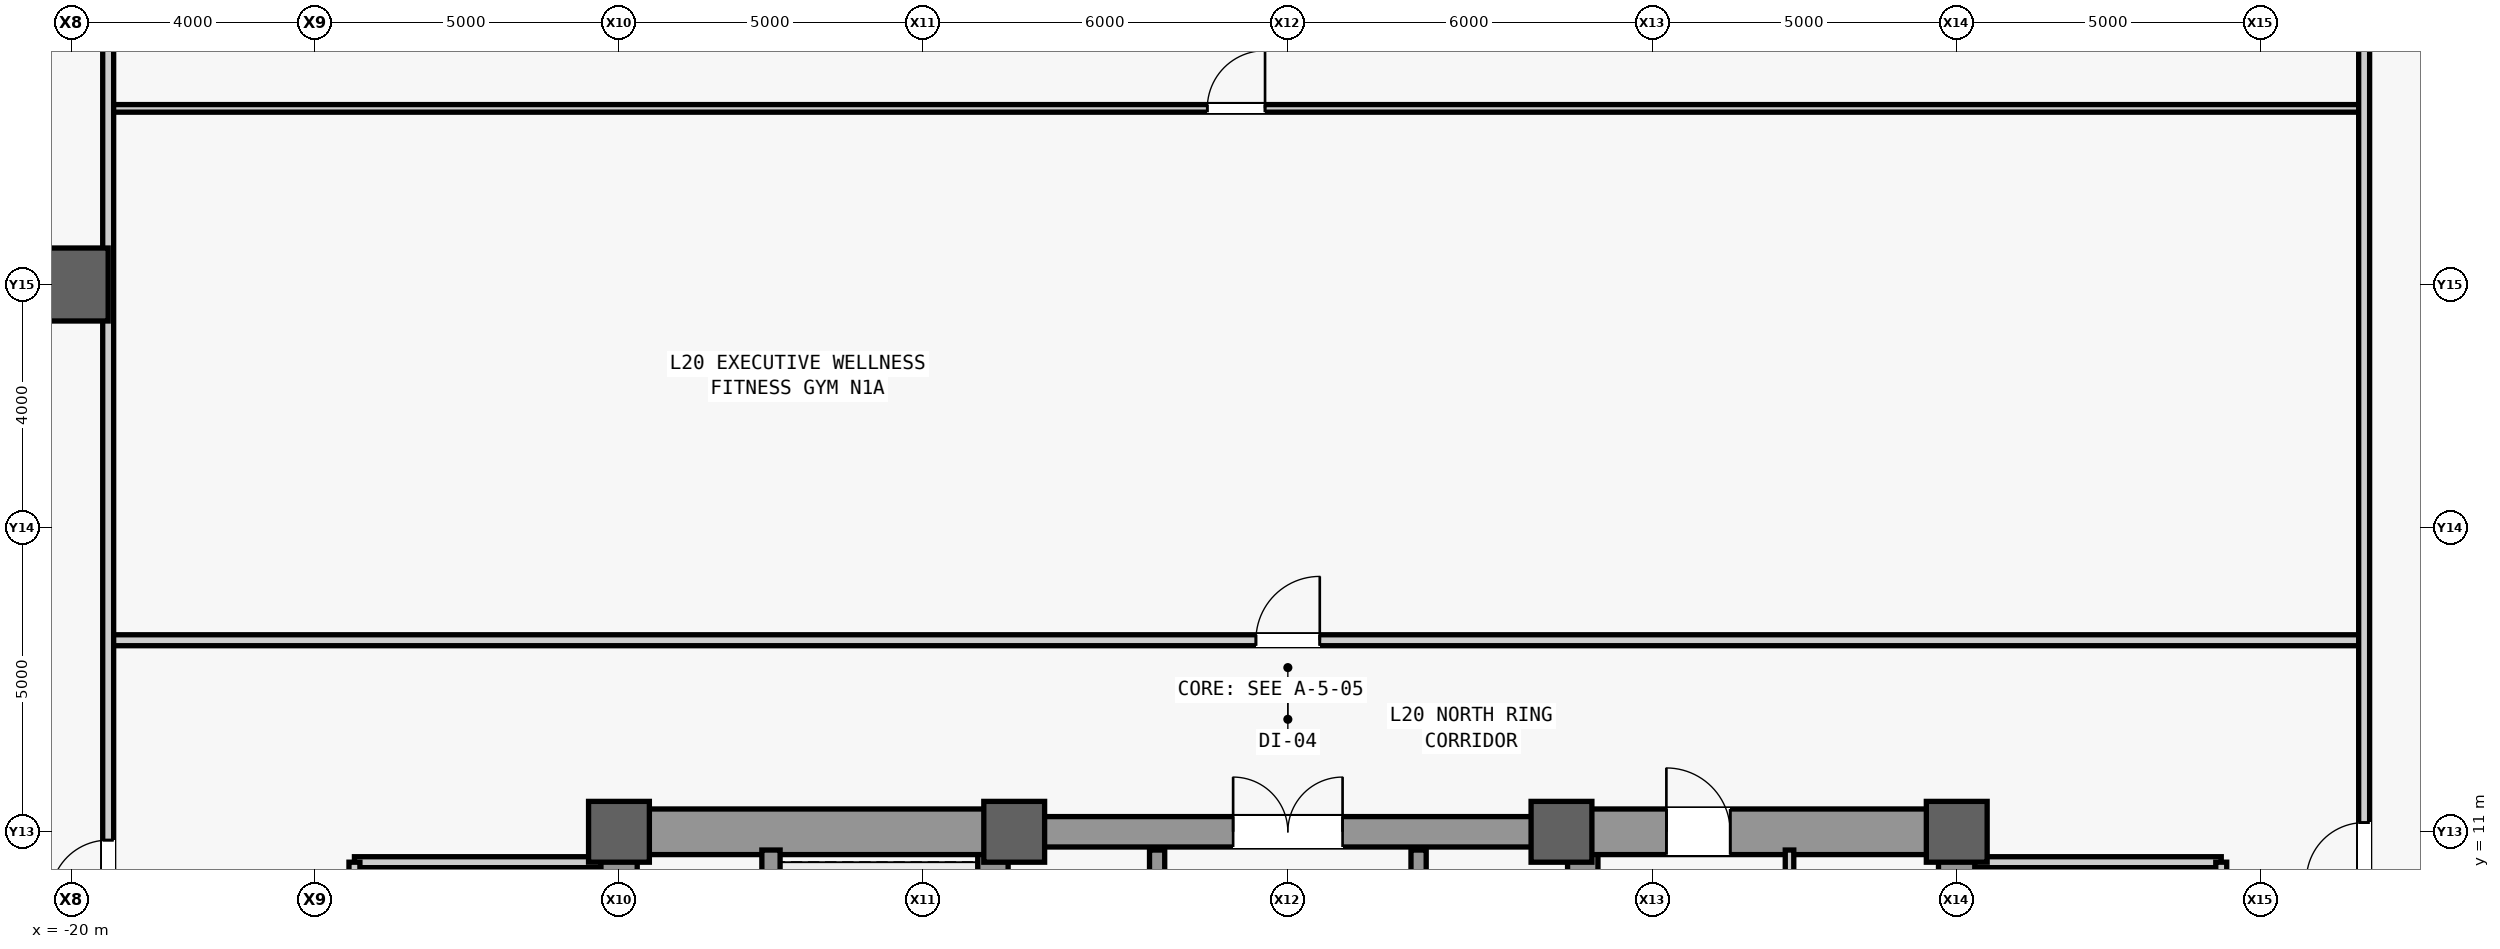
"""IFC4 building model, lengths in metres.
Left out: names, types, materials, properties, quantities, classifications, styles, units other than length and angle.
Written with IfcOpenShell. Run it as: python <this file> out.ifc"""

import sys

from ifc_helpers import new_model, si_unit, direction, frame, frame_2d, origin, origin_2d, place, context, subcontext, project, spatial, rectangle, hollow_rectangle, extrude, source, transform, mapped, element, fill, save


model = new_model("IFC4")
c1 = context("Model", 3, precision=1e-05, world=origin(), true_north=direction((0.0, 1.0)))
c2 = subcontext(c1, "Body", "Model", "MODEL_VIEW")
j1 = project(units=[si_unit("LENGTHUNIT", "METRE"), si_unit("PLANEANGLEUNIT", "RADIAN")], contexts=[c1])
p1 = place(None, origin())
s1 = spatial("IfcSite", under=j1, at=p1, CompositionType="ELEMENT")
p2 = place(p1, origin())
s2 = spatial("IfcBuilding", under=s1, at=p2, CompositionType="ELEMENT")
p3 = place(p2, frame((0.0, 0.0, 91.4)))
s3 = spatial("IfcBuildingStorey", under=s2, at=p3, CompositionType="ELEMENT", Elevation=91.4)
m1 = source(origin(), c2, "Body", "SweptSolid", [
    extrude(rectangle(XDim=22.0, YDim=0.6, at=frame_2d((11.0, 0.0))), origin(), (0.0, 0.0, 1.0), 3.84),
])
p4 = place(p3, frame((-11.0, -11.0, 0.0), z_axis=(0.0, 0.0, 1.0), x_axis=(0.0, 1.0, 0.0)))
e1 = element("IfcWall", 1, at=p4, inside=s3, PredefinedType="SHEAR", context=c2, shape_type="MappedRepresentation", body=[
    mapped(m1, transform((0.0, 0.0, 0.0), scale=1.0)),
])
m2 = source(origin(), c2, "Body", "SweptSolid", [
    extrude(rectangle(XDim=1.1, YDim=2.2, at=frame_2d((0.55, 1.1))), frame((0.0, 0.31, 0.0), z_axis=(0.0, -1.0, 0.0), x_axis=(1.0, 0.0, 0.0)), (0.0, 0.0, 1.0), 0.62),
])
p5 = place(p4, frame((0.8, 0.0, 0.0)))
e2 = element("IfcOpeningElement", 2, at=p5, cuts=e1, PredefinedType="OPENING", context=c2, shape_type="MappedRepresentation", body=[
    mapped(m2, transform((0.0, 0.0, 0.0), scale=1.0)),
])
p6 = place(p4, frame((12.5, 0.0, 0.0)))
e3 = element("IfcOpeningElement", 3, at=p6, cuts=e1, PredefinedType="OPENING", context=c2, shape_type="MappedRepresentation", body=[
    mapped(m2, transform((0.0, 0.0, 0.0), scale=1.0)),
])
m3 = source(origin(), c2, "Body", "SweptSolid", [
    extrude(rectangle(XDim=0.9, YDim=2.15, at=frame_2d((0.45, 1.075))), frame((0.0, 0.31, 0.0), z_axis=(0.0, -1.0, 0.0), x_axis=(1.0, 0.0, 0.0)), (0.0, 0.0, 1.0), 0.62),
])
p7 = place(p4, frame((6.2, 0.0, 0.0)))
e4 = element("IfcOpeningElement", 4, at=p7, cuts=e1, PredefinedType="OPENING", context=c2, shape_type="MappedRepresentation", body=[
    mapped(m3, transform((0.0, 0.0, 0.0), scale=1.0)),
])
p8 = place(p4, frame((8.05, 0.0, 0.0)))
e5 = element("IfcOpeningElement", 5, at=p8, cuts=e1, PredefinedType="OPENING", context=c2, shape_type="MappedRepresentation", body=[
    mapped(m3, transform((0.0, 0.0, 0.0), scale=1.0)),
])
m4 = source(origin(), c2, "Body", "SweptSolid", [
    extrude(rectangle(XDim=1.3, YDim=2.3, at=frame_2d((0.65, 1.15))), frame((0.0, 0.31, 0.0), z_axis=(0.0, -1.0, 0.0), x_axis=(1.0, 0.0, 0.0)), (0.0, 0.0, 1.0), 0.62),
])
p9 = place(p4, frame((2.7, 0.0, 0.0)))
e6 = element("IfcOpeningElement", 6, at=p9, cuts=e1, PredefinedType="OPENING", context=c2, shape_type="MappedRepresentation", body=[
    mapped(m4, transform((0.0, 0.0, 0.0), scale=1.0)),
])
p10 = place(p3, frame((11.0, -11.0, 0.0), z_axis=(0.0, 0.0, 1.0), x_axis=(0.0, 1.0, 0.0)))
e7 = element("IfcWall", 7, at=p10, inside=s3, PredefinedType="SHEAR", context=c2, shape_type="MappedRepresentation", body=[
    mapped(m1, transform((0.0, 0.0, 0.0), scale=1.0)),
])
p11 = place(p10, frame((0.8, 0.0, 0.0)))
e8 = element("IfcOpeningElement", 8, at=p11, cuts=e7, PredefinedType="OPENING", context=c2, shape_type="MappedRepresentation", body=[
    mapped(m2, transform((0.0, 0.0, 0.0), scale=1.0)),
])
p12 = place(p10, frame((6.85, 0.0, 0.0)))
e9 = element("IfcOpeningElement", 9, at=p12, cuts=e7, PredefinedType="OPENING", context=c2, shape_type="MappedRepresentation", body=[
    mapped(m3, transform((0.0, 0.0, 0.0), scale=1.0)),
])
p13 = place(p10, frame((2.7, 0.0, 0.0)))
e10 = element("IfcOpeningElement", 10, at=p13, cuts=e7, PredefinedType="OPENING", context=c2, shape_type="MappedRepresentation", body=[
    mapped(m4, transform((0.0, 0.0, 0.0), scale=1.0)),
])
p14 = place(p10, frame((13.35, 0.0, 0.0)))
e11 = element("IfcOpeningElement", 11, at=p14, cuts=e7, PredefinedType="OPENING", context=c2, shape_type="MappedRepresentation", body=[
    mapped(m4, transform((0.0, 0.0, 0.0), scale=1.0)),
])
m5 = source(origin(), c2, "Body", "SweptSolid", [
    extrude(rectangle(XDim=21.4, YDim=0.5, at=frame_2d((10.7, 0.0))), origin(), (0.0, 0.0, 1.0), 3.84),
])
for number, where, z_axis, x_axis in (
    (12, (-4.85, -10.7, 0.0), (0.0, 0.0, 1.0), (0.0, 1.0, 0.0)),
    (13, (4.85, -10.7, 0.0), (0.0, 0.0, 1.0), (0.0, 1.0, 0.0)),
):
    element("IfcWall", number, at=place(p3, frame(where, z_axis=z_axis, x_axis=x_axis)), inside=s3, PredefinedType="SHEAR", context=c2, shape_type="MappedRepresentation", body=[
        mapped(m5, transform((0.0, 0.0, 0.0), scale=1.0)),
    ])
m6 = source(origin(), c2, "Body", "SweptSolid", [
    extrude(rectangle(XDim=5.85, YDim=0.75, at=frame_2d((2.925, 0.0))), origin(), (0.0, 0.0, 1.0), 3.84),
])
p15 = place(p3, frame((-10.7, 11.0, 0.0), z_axis=(0.0, 0.0, 1.0), x_axis=(1.0, 0.0, 0.0)))
e14 = element("IfcWall", 14, at=p15, inside=s3, PredefinedType="SHEAR", context=c2, shape_type="MappedRepresentation", body=[
    mapped(m6, transform((0.0, 0.0, 0.0), scale=1.0)),
])
p16 = place(p3, frame((4.85, 11.0, 0.0), z_axis=(0.0, 0.0, 1.0), x_axis=(1.0, 0.0, 0.0)))
e15 = element("IfcWall", 15, at=p16, inside=s3, PredefinedType="SHEAR", context=c2, shape_type="MappedRepresentation", body=[
    mapped(m6, transform((0.0, 0.0, 0.0), scale=1.0)),
])
m7 = source(origin(), c2, "Body", "SweptSolid", [
    extrude(rectangle(XDim=1.05, YDim=2.2, at=frame_2d((0.525, 1.1))), frame((0.0, 0.385, 0.0), z_axis=(0.0, -1.0, 0.0), x_axis=(1.0, 0.0, 0.0)), (0.0, 0.0, 1.0), 0.77),
])
p17 = place(p16, frame((1.375, 0.0, 0.0)))
e16 = element("IfcOpeningElement", 16, at=p17, cuts=e15, PredefinedType="OPENING", context=c2, shape_type="MappedRepresentation", body=[
    mapped(m7, transform((0.0, 0.0, 0.0), scale=1.0)),
])
m8 = source(origin(), c2, "Body", "SweptSolid", [
    extrude(rectangle(XDim=9.2, YDim=0.5, at=frame_2d((4.6, 0.0))), origin(), (0.0, 0.0, 1.0), 3.84),
])
p18 = place(p3, frame((-4.6, 11.0, 0.0), z_axis=(0.0, 0.0, 1.0), x_axis=(1.0, 0.0, 0.0)))
e17 = element("IfcWall", 17, at=p18, inside=s3, PredefinedType="SHEAR", context=c2, shape_type="MappedRepresentation", body=[
    mapped(m8, transform((0.0, 0.0, 0.0), scale=1.0)),
])
m9 = source(origin(), c2, "Body", "SweptSolid", [
    extrude(rectangle(XDim=1.8, YDim=2.25, at=frame_2d((0.9, 1.125))), frame((0.0, 0.26, 0.0), z_axis=(0.0, -1.0, 0.0), x_axis=(1.0, 0.0, 0.0)), (0.0, 0.0, 1.0), 0.52),
])
p19 = place(p18, frame((3.7, 0.0, 0.0)))
e18 = element("IfcOpeningElement", 18, at=p19, cuts=e17, PredefinedType="OPENING", context=c2, shape_type="MappedRepresentation", body=[
    mapped(m9, transform((0.0, 0.0, 0.0), scale=1.0)),
])
m10 = source(origin(), c2, "Body", "SweptSolid", [
    extrude(hollow_rectangle(XDim=1.2, YDim=1.2, WallThickness=0.07, at=origin_2d()), origin(), (0.0, 0.0, 1.0), 4.1),
])
p20 = place(p3, frame((-20.0, 20.0, 0.0), z_axis=(0.0, 0.0, 1.0), x_axis=(1.0, 0.0, 0.0)))
e19 = element("IfcColumn", 19, at=p20, inside=s3, PredefinedType="COLUMN", context=c2, shape_type="MappedRepresentation", body=[
    mapped(m10, transform((0.0, 0.0, 0.0), scale=1.0)),
])
m11 = source(origin(), c2, "Body", "SweptSolid", [
    extrude(rectangle(XDim=1.0, YDim=1.0, at=origin_2d()), origin(), (0.0, 0.0, 1.0), 4.1),
])
for number, where, z_axis, x_axis in (
    (20, (-11.0, 11.0, 0.0), (0.0, 0.0, 1.0), (1.0, 0.0, 0.0)),
    (21, (-4.5, 11.0, 0.0), (0.0, 0.0, 1.0), (1.0, 0.0, 0.0)),
    (22, (4.5, 11.0, 0.0), (0.0, 0.0, 1.0), (1.0, 0.0, 0.0)),
    (23, (11.0, 11.0, 0.0), (0.0, 0.0, 1.0), (1.0, 0.0, 0.0)),
):
    element("IfcColumn", number, at=place(p3, frame(where, z_axis=z_axis, x_axis=x_axis)), inside=s3, PredefinedType="COLUMN", context=c2, shape_type="MappedRepresentation", body=[
        mapped(m11, transform((0.0, 0.0, 0.0), scale=1.0)),
    ])
m12 = source(origin(), c2, "Body", "SweptSolid", [
    extrude(rectangle(XDim=7.75, YDim=0.3, at=frame_2d((3.875, 0.0))), origin(), (0.0, 0.0, 1.0), 3.84),
])
p21 = place(p3, frame((-8.5, 2.95, 0.0), z_axis=(0.0, 0.0, 1.0), x_axis=(0.0, 1.0, 0.0)))
e24 = element("IfcWall", 24, at=p21, inside=s3, PredefinedType="SHEAR", context=c2, shape_type="MappedRepresentation", body=[
    mapped(m12, transform((0.0, 0.0, 0.0), scale=1.0)),
])
m13 = source(origin(), c2, "Body", "SweptSolid", [
    extrude(rectangle(XDim=9.4, YDim=0.14, at=frame_2d((4.7, 0.0))), origin(), (0.0, 0.0, 1.0), 3.84),
])
p22 = place(p3, frame((8.25, 1.3, 0.0), z_axis=(0.0, 0.0, 1.0), x_axis=(0.0, 1.0, 0.0)))
e25 = element("IfcWall", 25, at=p22, inside=s3, PredefinedType="PARTITIONING", context=c2, shape_type="MappedRepresentation", body=[
    mapped(m13, transform((0.0, 0.0, 0.0), scale=1.0)),
])
m14 = source(origin(), c2, "Body", "SweptSolid", [
    extrude(rectangle(XDim=4.05, YDim=0.18, at=frame_2d((2.025, 0.0))), origin(), (0.0, 0.0, 1.0), 3.84),
])
p23 = place(p3, frame((-15.35, 10.5, 0.0), z_axis=(0.0, 0.0, 1.0), x_axis=(1.0, 0.0, 0.0)))
e26 = element("IfcWall", 26, at=p23, inside=s3, PredefinedType="PARTITIONING", context=c2, shape_type="MappedRepresentation", body=[
    mapped(m14, transform((0.0, 0.0, 0.0), scale=1.0)),
])
m15 = source(origin(), c2, "Body", "SweptSolid", [
    extrude(rectangle(XDim=16.6, YDim=0.18, at=frame_2d((8.3, 0.0))), origin(), (0.0, 0.0, 1.0), 3.84),
])
p24 = place(p3, frame((-15.35, -6.1, 0.0), z_axis=(0.0, 0.0, 1.0), x_axis=(0.0, 1.0, 0.0)))
e27 = element("IfcWall", 27, at=p24, inside=s3, PredefinedType="PARTITIONING", context=c2, shape_type="MappedRepresentation", body=[
    mapped(m15, transform((0.0, 0.0, 0.0), scale=1.0)),
])
m16 = source(origin(), c2, "Body", "SweptSolid", [
    extrude(rectangle(XDim=1.8, YDim=2.25, at=frame_2d((0.9, 1.125))), frame((0.0, 0.1, 0.0), z_axis=(0.0, -1.0, 0.0), x_axis=(1.0, 0.0, 0.0)), (0.0, 0.0, 1.0), 0.2),
])
p25 = place(p24, frame((2.7, 0.0, 0.0)))
e28 = element("IfcOpeningElement", 28, at=p25, cuts=e27, PredefinedType="OPENING", context=c2, shape_type="MappedRepresentation", body=[
    mapped(m16, transform((0.0, 0.0, 0.0), scale=1.0)),
])
p26 = place(p24, frame((11.0, 0.0, 0.0)))
e29 = element("IfcOpeningElement", 29, at=p26, cuts=e27, PredefinedType="OPENING", context=c2, shape_type="MappedRepresentation", body=[
    mapped(m16, transform((0.0, 0.0, 0.0), scale=1.0)),
])
p27 = place(p3, frame((11.3, 10.5, 0.0), z_axis=(0.0, 0.0, 1.0), x_axis=(1.0, 0.0, 0.0)))
e30 = element("IfcWall", 30, at=p27, inside=s3, PredefinedType="PARTITIONING", context=c2, shape_type="MappedRepresentation", body=[
    mapped(m14, transform((0.0, 0.0, 0.0), scale=1.0)),
])
p28 = place(p3, frame((15.35, -6.1, 0.0), z_axis=(0.0, 0.0, 1.0), x_axis=(0.0, 1.0, 0.0)))
e31 = element("IfcWall", 31, at=p28, inside=s3, PredefinedType="PARTITIONING", context=c2, shape_type="MappedRepresentation", body=[
    mapped(m15, transform((0.0, 0.0, 0.0), scale=1.0)),
])
p29 = place(p28, frame((2.7, 0.0, 0.0)))
e32 = element("IfcOpeningElement", 32, at=p29, cuts=e31, PredefinedType="OPENING", context=c2, shape_type="MappedRepresentation", body=[
    mapped(m16, transform((0.0, 0.0, 0.0), scale=1.0)),
])
p30 = place(p28, frame((13.0, 0.0, 0.0)))
e33 = element("IfcOpeningElement", 33, at=p30, cuts=e31, PredefinedType="OPENING", context=c2, shape_type="MappedRepresentation", body=[
    mapped(m16, transform((0.0, 0.0, 0.0), scale=1.0)),
])
m17 = source(origin(), c2, "Body", "SweptSolid", [
    extrude(rectangle(XDim=5.4, YDim=0.25, at=frame_2d((2.7, 0.0))), origin(), (0.0, 0.0, 1.0), 3.84),
])
for number, where, z_axis, x_axis in (
    (34, (-2.15, 5.3, 0.0), (0.0, 0.0, 1.0), (0.0, 1.0, 0.0)),
    (35, (2.15, 5.3, 0.0), (0.0, 0.0, 1.0), (0.0, 1.0, 0.0)),
):
    element("IfcWall", number, at=place(p3, frame(where, z_axis=z_axis, x_axis=x_axis)), inside=s3, PredefinedType="SHEAR", context=c2, shape_type="MappedRepresentation", body=[
        mapped(m17, transform((0.0, 0.0, 0.0), scale=1.0)),
    ])
m18 = source(origin(), c2, "Body", "SweptSolid", [
    extrude(rectangle(XDim=37.1, YDim=0.125, at=frame_2d((18.55, 0.0))), origin(), (0.0, 0.0, 1.0), 3.84),
])
p31 = place(p3, frame((-19.4, 22.896, 0.0), z_axis=(0.0, 0.0, 1.0), x_axis=(1.0, 0.0, 0.0)))
e36 = element("IfcWall", 36, at=p31, inside=s3, PredefinedType="PARTITIONING", context=c2, shape_type="MappedRepresentation", body=[
    mapped(m18, transform((0.0, 0.0, 0.0), scale=1.0)),
])
m19 = source(origin(), c2, "Body", "SweptSolid", [
    extrude(rectangle(XDim=0.95, YDim=2.15, at=frame_2d((0.475, 1.075))), frame((0.0, 0.073, 0.0), z_axis=(0.0, -1.0, 0.0), x_axis=(1.0, 0.0, 0.0)), (0.0, 0.0, 1.0), 0.145),
])
p32 = place(p31, frame((18.075, 0.0, 0.0)))
e37 = element("IfcOpeningElement", 37, at=p32, cuts=e36, PredefinedType="OPENING", context=c2, shape_type="MappedRepresentation", body=[
    mapped(m19, transform((0.0, 0.0, 0.0), scale=1.0)),
])
m20 = source(origin(), c2, "Body", "SweptSolid", [
    extrude(rectangle(XDim=37.1, YDim=0.18, at=frame_2d((18.55, 0.0))), origin(), (0.0, 0.0, 1.0), 3.84),
])
p33 = place(p3, frame((-19.4, 14.15, 0.0), z_axis=(0.0, 0.0, 1.0), x_axis=(1.0, 0.0, 0.0)))
e38 = element("IfcWall", 38, at=p33, inside=s3, PredefinedType="PARTITIONING", context=c2, shape_type="MappedRepresentation", body=[
    mapped(m20, transform((0.0, 0.0, 0.0), scale=1.0)),
])
m21 = source(origin(), c2, "Body", "SweptSolid", [
    extrude(rectangle(XDim=1.05, YDim=2.2, at=frame_2d((0.525, 1.1))), frame((0.0, 0.1, 0.0), z_axis=(0.0, -1.0, 0.0), x_axis=(1.0, 0.0, 0.0)), (0.0, 0.0, 1.0), 0.2),
])
p34 = place(p33, frame((18.875, 0.0, 0.0)))
e39 = element("IfcOpeningElement", 39, at=p34, cuts=e38, PredefinedType="OPENING", context=c2, shape_type="MappedRepresentation", body=[
    mapped(m21, transform((0.0, 0.0, 0.0), scale=1.0)),
])
m22 = source(origin(), c2, "Body", "SweptSolid", [
    extrude(rectangle(XDim=56.0, YDim=0.18, at=frame_2d((28.0, 0.0))), origin(), (0.0, 0.0, 1.0), 3.371),
])
p35 = place(p3, frame((-19.4, -28.0, 0.0), z_axis=(0.0, 0.0, 1.0), x_axis=(0.0, 1.0, 0.0)))
e40 = element("IfcWall", 40, at=p35, inside=s3, PredefinedType="PARTITIONING", context=c2, shape_type="MappedRepresentation", body=[
    mapped(m22, transform((0.0, 0.0, 0.0), scale=1.0)),
])
m23 = source(origin(), c2, "Body", "SweptSolid", [
    extrude(rectangle(XDim=0.95, YDim=2.15, at=frame_2d((0.475, 1.075))), frame((0.0, 0.1, 0.0), z_axis=(0.0, -1.0, 0.0), x_axis=(1.0, 0.0, 0.0)), (0.0, 0.0, 1.0), 0.2),
])
p36 = place(p35, frame((16.299, 0.0, 0.0)))
e41 = element("IfcOpeningElement", 41, at=p36, cuts=e40, PredefinedType="OPENING", context=c2, shape_type="MappedRepresentation", body=[
    mapped(m23, transform((0.0, 0.0, 0.0), scale=1.0)),
])
p37 = place(p35, frame((22.923, 0.0, 0.0)))
e42 = element("IfcOpeningElement", 42, at=p37, cuts=e40, PredefinedType="OPENING", context=c2, shape_type="MappedRepresentation", body=[
    mapped(m23, transform((0.0, 0.0, 0.0), scale=1.0)),
])
p38 = place(p35, frame((30.712, 0.0, 0.0)))
e43 = element("IfcOpeningElement", 43, at=p38, cuts=e40, PredefinedType="OPENING", context=c2, shape_type="MappedRepresentation", body=[
    mapped(m23, transform((0.0, 0.0, 0.0), scale=1.0)),
])
p39 = place(p35, frame((37.913, 0.0, 0.0)))
e44 = element("IfcOpeningElement", 44, at=p39, cuts=e40, PredefinedType="OPENING", context=c2, shape_type="MappedRepresentation", body=[
    mapped(m23, transform((0.0, 0.0, 0.0), scale=1.0)),
])
m24 = source(origin(), c2, "Body", "SweptSolid", [
    extrude(rectangle(XDim=56.0, YDim=0.18, at=frame_2d((28.0, 0.0))), origin(), (0.0, 0.0, 1.0), 3.84),
])
p40 = place(p3, frame((17.7, -28.0, 0.0), z_axis=(0.0, 0.0, 1.0), x_axis=(0.0, 1.0, 0.0)))
e45 = element("IfcWall", 45, at=p40, inside=s3, PredefinedType="PARTITIONING", context=c2, shape_type="MappedRepresentation", body=[
    mapped(m24, transform((0.0, 0.0, 0.0), scale=1.0)),
])
p41 = place(p40, frame((16.587, 0.0, 0.0)))
e46 = element("IfcOpeningElement", 46, at=p41, cuts=e45, PredefinedType="OPENING", context=c2, shape_type="MappedRepresentation", body=[
    mapped(m23, transform((0.0, 0.0, 0.0), scale=1.0)),
])
p42 = place(p40, frame((23.788, 0.0, 0.0)))
e47 = element("IfcOpeningElement", 47, at=p42, cuts=e45, PredefinedType="OPENING", context=c2, shape_type="MappedRepresentation", body=[
    mapped(m23, transform((0.0, 0.0, 0.0), scale=1.0)),
])
p43 = place(p40, frame((31.577, 0.0, 0.0)))
e48 = element("IfcOpeningElement", 48, at=p43, cuts=e45, PredefinedType="OPENING", context=c2, shape_type="MappedRepresentation", body=[
    mapped(m23, transform((0.0, 0.0, 0.0), scale=1.0)),
])
p44 = place(p40, frame((38.201, 0.0, 0.0)))
e49 = element("IfcOpeningElement", 49, at=p44, cuts=e45, PredefinedType="OPENING", context=c2, shape_type="MappedRepresentation", body=[
    mapped(m23, transform((0.0, 0.0, 0.0), scale=1.0)),
])
m25 = source(origin(), c2, "Body", "SweptSolid", [
    extrude(rectangle(XDim=1.05, YDim=2.2, at=frame_2d((0.525, 1.1))), frame((0.0, 0.025, 0.0), z_axis=(0.0, -1.0, 0.0), x_axis=(1.0, 0.0, 0.0)), (0.0, 0.0, 1.0), 0.05),
])
p45 = place(p17, origin())
e50 = element("IfcDoor", 50, at=p45, inside=s3, OperationType="SINGLE_SWING_LEFT", PredefinedType="DOOR", context=c2, shape_type="MappedRepresentation", body=[
    mapped(m25, transform((0.0, 0.0, 0.0), scale=1.0)),
])
fill(e16, e50)
m26 = source(origin(), c2, "Body", "SweptSolid", [
    extrude(rectangle(XDim=1.8, YDim=2.25, at=frame_2d((0.9, 1.125))), frame((0.0, 0.025, 0.0), z_axis=(0.0, -1.0, 0.0), x_axis=(1.0, 0.0, 0.0)), (0.0, 0.0, 1.0), 0.05),
])
p46 = place(p19, origin())
e51 = element("IfcDoor", 51, at=p46, inside=s3, OperationType="SINGLE_SWING_RIGHT", PredefinedType="DOOR", context=c2, shape_type="MappedRepresentation", body=[
    mapped(m26, transform((0.0, 0.0, 0.0), scale=1.0)),
])
fill(e18, e51)
m27 = source(origin(), c2, "Body", "SweptSolid", [
    extrude(rectangle(XDim=0.95, YDim=2.15, at=frame_2d((0.475, 1.075))), frame((0.0, 0.025, 0.0), z_axis=(0.0, -1.0, 0.0), x_axis=(1.0, 0.0, 0.0)), (0.0, 0.0, 1.0), 0.05),
])
p47 = place(p32, origin())
e52 = element("IfcDoor", 52, at=p47, inside=s3, OperationType="SINGLE_SWING_RIGHT", PredefinedType="DOOR", context=c2, shape_type="MappedRepresentation", body=[
    mapped(m27, transform((0.0, 0.0, 0.0), scale=1.0)),
])
fill(e37, e52)
p48 = place(p34, origin())
e53 = element("IfcDoor", 53, at=p48, inside=s3, OperationType="SINGLE_SWING_RIGHT", PredefinedType="DOOR", context=c2, shape_type="MappedRepresentation", body=[
    mapped(m25, transform((0.0, 0.0, 0.0), scale=1.0)),
])
fill(e39, e53)
p49 = place(p39, origin())
e54 = element("IfcDoor", 54, at=p49, inside=s3, OperationType="SINGLE_SWING_LEFT", PredefinedType="DOOR", context=c2, shape_type="MappedRepresentation", body=[
    mapped(m27, transform((0.0, 0.0, 0.0), scale=1.0)),
])
fill(e44, e54)
p50 = place(p44, origin())
e55 = element("IfcDoor", 55, at=p50, inside=s3, OperationType="SINGLE_SWING_LEFT", PredefinedType="DOOR", context=c2, shape_type="MappedRepresentation", body=[
    mapped(m27, transform((0.0, 0.0, 0.0), scale=1.0)),
])
fill(e49, e55)
save(model, sys.argv[1])
